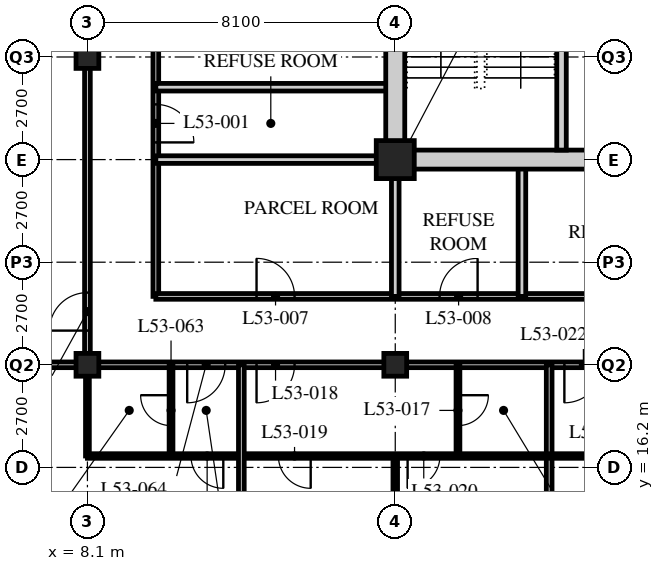
"""IFC4 building model, lengths in metres.
Left out: names, types, materials, properties, quantities, classifications, styles, units other than length and angle.
Written with IfcOpenShell. Run it as: python <this file> out.ifc"""

import sys

from ifc_helpers import new_model, si_unit, direction, frame, frame_2d, origin, origin_2d, place, context, subcontext, project, spatial, rectangle, hollow_rectangle, extrude, element, fill, save


model = new_model("IFC4")
c1 = context("Model", 3, precision=1e-05, world=origin(), true_north=direction((0.0, 1.0)))
c2 = subcontext(c1, "Body", "Model", "MODEL_VIEW")
j1 = project(units=[si_unit("LENGTHUNIT", "METRE"), si_unit("PLANEANGLEUNIT", "RADIAN")], contexts=[c1])
p1 = place(None, origin())
s1 = spatial("IfcSite", under=j1, at=p1, CompositionType="ELEMENT")
p2 = place(p1, origin())
s2 = spatial("IfcBuilding", under=s1, at=p2, CompositionType="ELEMENT")
p3 = place(p2, frame((0.0, 0.0, 206.4)))
s3 = spatial("IfcBuildingStorey", under=s2, at=p3, CompositionType="ELEMENT", Elevation=206.4)
for number, where, z_axis, x_axis in (
    (1, (8.1, 18.9, 0.0), (0.0, 0.0, 1.0), (1.0, 0.0, 0.0)),
    (2, (8.1, 27.0, 0.0), (0.0, 0.0, 1.0), (1.0, 0.0, 0.0)),
    (3, (16.2, 18.9, 0.0), (0.0, 0.0, 1.0), (1.0, 0.0, 0.0)),
):
    element("IfcColumn", number, at=place(p3, frame(where, z_axis=z_axis, x_axis=x_axis)), inside=s3, PredefinedType="COLUMN", context=c2, shape_type="SweptSolid", body=[
        extrude(hollow_rectangle(XDim=0.6, YDim=0.6, WallThickness=0.05, at=origin_2d()), origin(), (0.0, 0.0, 1.0), 3.6),
    ])
p4 = place(p3, frame((16.2, 24.3, 0.0), z_axis=(0.0, 0.0, 1.0), x_axis=(1.0, 0.0, 0.0)))
e4 = element("IfcColumn", 4, at=p4, inside=s3, PredefinedType="COLUMN", context=c2, shape_type="SweptSolid", body=[
    extrude(hollow_rectangle(XDim=1.0, YDim=1.0, WallThickness=0.1, at=origin_2d()), origin(), (0.0, 0.0, 1.0), 3.6),
])
p5 = place(p3, frame((8.1, 18.9, 0.0), z_axis=(0.0, 0.0, 1.0), x_axis=(1.0, 0.0, 0.0)))
e5 = element("IfcWall", 5, at=p5, inside=s3, PredefinedType="PARTITIONING", context=c2, shape_type="SweptSolid", body=[
    extrude(rectangle(XDim=36.45, YDim=0.15, at=frame_2d((18.225, 0.0))), origin(), (0.0, 0.0, 1.0), 2.778),
])
p6 = place(p5, frame((4.45, 0.0, 0.0)))
e6 = element("IfcOpeningElement", 6, at=p6, cuts=e5, PredefinedType="OPENING", context=c2, shape_type="SweptSolid", body=[
    extrude(rectangle(XDim=1.0, YDim=2.1, at=frame_2d((0.5, 1.05))), frame((0.0, 0.085, 0.0), z_axis=(0.0, -1.0, 0.0), x_axis=(1.0, 0.0, 0.0)), (0.0, 0.0, 1.0), 0.17),
])
p7 = place(p5, frame((12.55, 0.0, 0.0)))
e7 = element("IfcOpeningElement", 7, at=p7, cuts=e5, PredefinedType="OPENING", context=c2, shape_type="SweptSolid", body=[
    extrude(rectangle(XDim=1.0, YDim=2.1, at=frame_2d((0.5, 1.05))), frame((0.0, 0.085, 0.0), z_axis=(0.0, -1.0, 0.0), x_axis=(1.0, 0.0, 0.0)), (0.0, 0.0, 1.0), 0.17),
])
p8 = place(p5, frame((29.05, 0.0, 0.0)))
e8 = element("IfcOpeningElement", 8, at=p8, cuts=e5, PredefinedType="OPENING", context=c2, shape_type="SweptSolid", body=[
    extrude(rectangle(XDim=1.0, YDim=2.1, at=frame_2d((0.5, 1.05))), frame((0.0, 0.085, 0.0), z_axis=(0.0, -1.0, 0.0), x_axis=(1.0, 0.0, 0.0)), (0.0, 0.0, 1.0), 0.17),
])
p9 = place(p5, frame((2.625, 0.0, 0.0)))
e9 = element("IfcOpeningElement", 9, at=p9, cuts=e5, PredefinedType="OPENING", context=c2, shape_type="SweptSolid", body=[
    extrude(rectangle(XDim=1.0, YDim=2.1, at=frame_2d((0.5, 1.05))), frame((0.0, 0.085, 0.0), z_axis=(0.0, -1.0, 0.0), x_axis=(1.0, 0.0, 0.0)), (0.0, 0.0, 1.0), 0.17),
])
p10 = place(p5, frame((33.925, 0.0, 0.0)))
e10 = element("IfcOpeningElement", 10, at=p10, cuts=e5, PredefinedType="OPENING", context=c2, shape_type="SweptSolid", body=[
    extrude(rectangle(XDim=1.0, YDim=2.1, at=frame_2d((0.5, 1.05))), frame((0.0, 0.085, 0.0), z_axis=(0.0, -1.0, 0.0), x_axis=(1.0, 0.0, 0.0)), (0.0, 0.0, 1.0), 0.17),
])
p11 = place(p3, frame((8.1, 18.9, 0.0), z_axis=(0.0, 0.0, 1.0), x_axis=(0.0, 1.0, 0.0)))
e11 = element("IfcWall", 11, at=p11, inside=s3, PredefinedType="PARTITIONING", context=c2, shape_type="SweptSolid", body=[
    extrude(rectangle(XDim=28.35, YDim=0.15, at=frame_2d((14.175, 0.0))), origin(), (0.0, 0.0, 1.0), 2.778),
])
p12 = place(p11, frame((0.9, 0.0, 0.0)))
e12 = element("IfcOpeningElement", 12, at=p12, cuts=e11, PredefinedType="OPENING", context=c2, shape_type="SweptSolid", body=[
    extrude(rectangle(XDim=1.0, YDim=2.1, at=frame_2d((0.5, 1.05))), frame((0.0, 0.085, 0.0), z_axis=(0.0, -1.0, 0.0), x_axis=(1.0, 0.0, 0.0)), (0.0, 0.0, 1.0), 0.17),
])
p13 = place(p11, frame((17.1, 0.0, 0.0)))
e13 = element("IfcOpeningElement", 13, at=p13, cuts=e11, PredefinedType="OPENING", context=c2, shape_type="SweptSolid", body=[
    extrude(rectangle(XDim=1.0, YDim=2.1, at=frame_2d((0.5, 1.05))), frame((0.0, 0.085, 0.0), z_axis=(0.0, -1.0, 0.0), x_axis=(1.0, 0.0, 0.0)), (0.0, 0.0, 1.0), 0.17),
])
p14 = place(p11, frame((26.65, 0.0, 0.0)))
e14 = element("IfcOpeningElement", 14, at=p14, cuts=e11, PredefinedType="OPENING", context=c2, shape_type="SweptSolid", body=[
    extrude(rectangle(XDim=1.0, YDim=2.1, at=frame_2d((0.5, 1.05))), frame((0.0, 0.085, 0.0), z_axis=(0.0, -1.0, 0.0), x_axis=(1.0, 0.0, 0.0)), (0.0, 0.0, 1.0), 0.17),
])
p15 = place(p3, frame((9.9, 45.45, 0.0), z_axis=(0.0, 0.0, 1.0), x_axis=(0.0, -1.0, 0.0)))
e15 = element("IfcWall", 15, at=p15, inside=s3, PredefinedType="PARTITIONING", context=c2, shape_type="SweptSolid", body=[
    extrude(rectangle(XDim=24.75, YDim=0.15, at=frame_2d((12.375, 0.0))), origin(), (0.0, 0.0, 1.0), 3.39),
])
p16 = place(p15, frame((19.698, 0.0, 0.0)))
e16 = element("IfcOpeningElement", 16, at=p16, cuts=e15, PredefinedType="OPENING", context=c2, shape_type="SweptSolid", body=[
    extrude(rectangle(XDim=1.0, YDim=2.1, at=frame_2d((0.5, 1.05))), frame((0.0, 0.085, 0.0), z_axis=(0.0, -1.0, 0.0), x_axis=(1.0, 0.0, 0.0)), (0.0, 0.0, 1.0), 0.17),
])
p17 = place(p15, frame((15.648, 0.0, 0.0)))
e17 = element("IfcOpeningElement", 17, at=p17, cuts=e15, PredefinedType="OPENING", context=c2, shape_type="SweptSolid", body=[
    extrude(rectangle(XDim=1.0, YDim=2.1, at=frame_2d((0.5, 1.05))), frame((0.0, 0.085, 0.0), z_axis=(0.0, -1.0, 0.0), x_axis=(1.0, 0.0, 0.0)), (0.0, 0.0, 1.0), 0.17),
])
p18 = place(p15, frame((10.248, 0.0, 0.0)))
e18 = element("IfcOpeningElement", 18, at=p18, cuts=e15, PredefinedType="OPENING", context=c2, shape_type="SweptSolid", body=[
    extrude(rectangle(XDim=1.0, YDim=2.1, at=frame_2d((0.5, 1.05))), frame((0.0, 0.085, 0.0), z_axis=(0.0, -1.0, 0.0), x_axis=(1.0, 0.0, 0.0)), (0.0, 0.0, 1.0), 0.17),
])
p19 = place(p15, frame((6.198, 0.0, 0.0)))
e19 = element("IfcOpeningElement", 19, at=p19, cuts=e15, PredefinedType="OPENING", context=c2, shape_type="SweptSolid", body=[
    extrude(rectangle(XDim=1.0, YDim=2.1, at=frame_2d((0.5, 1.05))), frame((0.0, 0.085, 0.0), z_axis=(0.0, -1.0, 0.0), x_axis=(1.0, 0.0, 0.0)), (0.0, 0.0, 1.0), 0.17),
])
p20 = place(p3, frame((9.9, 20.7, 0.0), z_axis=(0.0, 0.0, 1.0), x_axis=(1.0, 0.0, 0.0)))
e20 = element("IfcWall", 20, at=p20, inside=s3, PredefinedType="PARTITIONING", context=c2, shape_type="SweptSolid", body=[
    extrude(rectangle(XDim=17.24, YDim=0.15, at=frame_2d((8.62, 0.0))), origin(), (0.0, 0.0, 1.0), 3.39),
])
p21 = place(p20, frame((2.65, 0.0, 0.0)))
e21 = element("IfcOpeningElement", 21, at=p21, cuts=e20, PredefinedType="OPENING", context=c2, shape_type="SweptSolid", body=[
    extrude(rectangle(XDim=1.0, YDim=2.1, at=frame_2d((0.5, 1.05))), frame((0.0, 0.085, 0.0), z_axis=(0.0, -1.0, 0.0), x_axis=(1.0, 0.0, 0.0)), (0.0, 0.0, 1.0), 0.17),
])
p22 = place(p20, frame((7.467, 0.0, 0.0)))
e22 = element("IfcOpeningElement", 22, at=p22, cuts=e20, PredefinedType="OPENING", context=c2, shape_type="SweptSolid", body=[
    extrude(rectangle(XDim=1.0, YDim=2.1, at=frame_2d((0.5, 1.05))), frame((0.0, 0.085, 0.0), z_axis=(0.0, -1.0, 0.0), x_axis=(1.0, 0.0, 0.0)), (0.0, 0.0, 1.0), 0.17),
])
p23 = place(p20, frame((12.942, 0.0, 0.0)))
e23 = element("IfcOpeningElement", 23, at=p23, cuts=e20, PredefinedType="OPENING", context=c2, shape_type="SweptSolid", body=[
    extrude(rectangle(XDim=1.0, YDim=2.1, at=frame_2d((0.5, 1.05))), frame((0.0, 0.085, 0.0), z_axis=(0.0, -1.0, 0.0), x_axis=(1.0, 0.0, 0.0)), (0.0, 0.0, 1.0), 0.17),
])
p24 = place(p3, frame((9.9, 26.205, 0.0), z_axis=(0.0, 0.0, 1.0), x_axis=(1.0, 0.0, 0.0)))
e24 = element("IfcWall", 24, at=p24, inside=s3, PredefinedType="SOLIDWALL", context=c2, shape_type="SweptSolid", body=[
    extrude(rectangle(XDim=6.3, YDim=0.2, at=frame_2d((3.15, 0.0))), origin(), (0.0, 0.0, 1.0), 3.39),
])
p25 = place(p3, frame((16.2, 20.7, 0.0), z_axis=(0.0, 0.0, 1.0), x_axis=(0.0, 1.0, 0.0)))
e25 = element("IfcWall", 25, at=p25, inside=s3, PredefinedType="SOLIDWALL", context=c2, shape_type="SweptSolid", body=[
    extrude(rectangle(XDim=3.6, YDim=0.2, at=frame_2d((1.8, 0.0))), origin(), (0.0, 0.0, 1.0), 2.778),
])
p26 = place(p3, frame((19.533, 20.7, 0.0), z_axis=(0.0, 0.0, 1.0), x_axis=(0.0, 1.0, 0.0)))
e26 = element("IfcWall", 26, at=p26, inside=s3, PredefinedType="SOLIDWALL", context=c2, shape_type="SweptSolid", body=[
    extrude(rectangle(XDim=3.6, YDim=0.2, at=frame_2d((1.8, 0.0))), origin(), (0.0, 0.0, 1.0), 3.39),
])
p27 = place(p3, frame((9.9, 24.3, 0.0), z_axis=(0.0, 0.0, 1.0), x_axis=(1.0, 0.0, 0.0)))
e27 = element("IfcWall", 27, at=p27, inside=s3, PredefinedType="SOLIDWALL", context=c2, shape_type="SweptSolid", body=[
    extrude(rectangle(XDim=6.3, YDim=0.2, at=frame_2d((3.15, 0.0))), origin(), (0.0, 0.0, 1.0), 3.39),
])
p28 = place(p3, frame((17.85, 18.9, 0.0), z_axis=(0.0, 0.0, 1.0), x_axis=(0.0, -1.0, 0.0)))
e28 = element("IfcWall", 28, at=p28, inside=s3, PredefinedType="PARTITIONING", context=c2, shape_type="SweptSolid", body=[
    extrude(rectangle(XDim=2.4, YDim=0.1, at=frame_2d((1.2, 0.0))), origin(), (0.0, 0.0, 1.0), 3.39),
])
p29 = place(p28, frame((0.8, 0.0, 0.0)))
e29 = element("IfcOpeningElement", 29, at=p29, cuts=e28, PredefinedType="OPENING", context=c2, shape_type="SweptSolid", body=[
    extrude(rectangle(XDim=0.8, YDim=2.1, at=frame_2d((0.4, 1.05))), frame((0.0, 0.06, 0.0), z_axis=(0.0, -1.0, 0.0), x_axis=(1.0, 0.0, 0.0)), (0.0, 0.0, 1.0), 0.12),
])
p30 = place(p3, frame((16.2, 16.5, 0.0), z_axis=(0.0, 0.0, 1.0), x_axis=(0.0, -1.0, 0.0)))
e30 = element("IfcWall", 30, at=p30, inside=s3, PredefinedType="PARTITIONING", context=c2, shape_type="SweptSolid", body=[
    extrude(rectangle(XDim=5.4, YDim=0.12, at=frame_2d((2.7, 0.0))), origin(), (0.0, 0.0, 1.0), 2.778),
])
p31 = place(p3, frame((20.25, 18.9, 0.0), z_axis=(0.0, 0.0, 1.0), x_axis=(0.0, -1.0, 0.0)))
e31 = element("IfcWall", 31, at=p31, inside=s3, PredefinedType="PARTITIONING", context=c2, shape_type="SweptSolid", body=[
    extrude(rectangle(XDim=7.8, YDim=0.15, at=frame_2d((3.9, 0.0))), origin(), (0.0, 0.0, 1.0), 3.39),
])
p32 = place(p3, frame((8.1, 16.5, 0.0), z_axis=(0.0, 0.0, 1.0), x_axis=(1.0, 0.0, 0.0)))
e32 = element("IfcWall", 32, at=p32, inside=s3, PredefinedType="PARTITIONING", context=c2, shape_type="SweptSolid", body=[
    extrude(rectangle(XDim=28.35, YDim=0.12, at=frame_2d((14.175, 0.0))), origin(), (0.0, 0.0, 1.0), 3.39),
])
p33 = place(p32, frame((5.025, 0.0, 0.0)))
e33 = element("IfcOpeningElement", 33, at=p33, cuts=e32, PredefinedType="OPENING", context=c2, shape_type="SweptSolid", body=[
    extrude(rectangle(XDim=0.85, YDim=2.1, at=frame_2d((0.425, 1.05))), frame((0.0, 0.07, 0.0), z_axis=(0.0, -1.0, 0.0), x_axis=(1.0, 0.0, 0.0)), (0.0, 0.0, 1.0), 0.14),
])
p34 = place(p32, frame((8.425, 0.0, 0.0)))
e34 = element("IfcOpeningElement", 34, at=p34, cuts=e32, PredefinedType="OPENING", context=c2, shape_type="SweptSolid", body=[
    extrude(rectangle(XDim=0.85, YDim=2.1, at=frame_2d((0.425, 1.05))), frame((0.0, 0.07, 0.0), z_axis=(0.0, -1.0, 0.0), x_axis=(1.0, 0.0, 0.0)), (0.0, 0.0, 1.0), 0.14),
])
p35 = place(p32, frame((13.125, 0.0, 0.0)))
e35 = element("IfcOpeningElement", 35, at=p35, cuts=e32, PredefinedType="OPENING", context=c2, shape_type="SweptSolid", body=[
    extrude(rectangle(XDim=0.85, YDim=2.1, at=frame_2d((0.425, 1.05))), frame((0.0, 0.07, 0.0), z_axis=(0.0, -1.0, 0.0), x_axis=(1.0, 0.0, 0.0)), (0.0, 0.0, 1.0), 0.14),
])
p36 = place(p32, frame((20.575, 0.0, 0.0)))
e36 = element("IfcOpeningElement", 36, at=p36, cuts=e32, PredefinedType="OPENING", context=c2, shape_type="SweptSolid", body=[
    extrude(rectangle(XDim=0.85, YDim=2.1, at=frame_2d((0.425, 1.05))), frame((0.0, 0.07, 0.0), z_axis=(0.0, -1.0, 0.0), x_axis=(1.0, 0.0, 0.0)), (0.0, 0.0, 1.0), 0.14),
])
p37 = place(p32, frame((24.625, 0.0, 0.0)))
e37 = element("IfcOpeningElement", 37, at=p37, cuts=e32, PredefinedType="OPENING", context=c2, shape_type="SweptSolid", body=[
    extrude(rectangle(XDim=0.85, YDim=2.1, at=frame_2d((0.425, 1.05))), frame((0.0, 0.07, 0.0), z_axis=(0.0, -1.0, 0.0), x_axis=(1.0, 0.0, 0.0)), (0.0, 0.0, 1.0), 0.14),
])
p38 = place(p32, frame((2.725, 0.0, 0.0)))
e38 = element("IfcOpeningElement", 38, at=p38, cuts=e32, PredefinedType="OPENING", context=c2, shape_type="SweptSolid", body=[
    extrude(rectangle(XDim=0.85, YDim=2.1, at=frame_2d((0.425, 1.05))), frame((0.0, 0.07, 0.0), z_axis=(0.0, -1.0, 0.0), x_axis=(1.0, 0.0, 0.0)), (0.0, 0.0, 1.0), 0.14),
])
p39 = place(p3, frame((10.3, 18.9, 0.0), z_axis=(0.0, 0.0, 1.0), x_axis=(0.0, -1.0, 0.0)))
e39 = element("IfcWall", 39, at=p39, inside=s3, PredefinedType="PARTITIONING", context=c2, shape_type="SweptSolid", body=[
    extrude(rectangle(XDim=2.4, YDim=0.1, at=frame_2d((1.2, 0.0))), origin(), (0.0, 0.0, 1.0), 3.39),
])
p40 = place(p39, frame((0.8, 0.0, 0.0)))
e40 = element("IfcOpeningElement", 40, at=p40, cuts=e39, PredefinedType="OPENING", context=c2, shape_type="SweptSolid", body=[
    extrude(rectangle(XDim=0.8, YDim=2.1, at=frame_2d((0.4, 1.05))), frame((0.0, 0.06, 0.0), z_axis=(0.0, -1.0, 0.0), x_axis=(1.0, 0.0, 0.0)), (0.0, 0.0, 1.0), 0.12),
])
p41 = place(p3, frame((8.1, 18.9, 0.0), z_axis=(0.0, 0.0, 1.0), x_axis=(0.0, -1.0, 0.0)))
e41 = element("IfcWall", 41, at=p41, inside=s3, PredefinedType="PARTITIONING", context=c2, shape_type="SweptSolid", body=[
    extrude(rectangle(XDim=2.4, YDim=0.1, at=frame_2d((1.2, 0.0))), origin(), (0.0, 0.0, 1.0), 2.778),
])
p42 = place(p3, frame((4.35, 18.9, 0.0), z_axis=(0.0, 0.0, 1.0), x_axis=(1.0, 0.0, 0.0)))
e42 = element("IfcWall", 42, at=p42, inside=s3, PredefinedType="PARTITIONING", context=c2, shape_type="SweptSolid", body=[
    extrude(rectangle(XDim=3.75, YDim=0.15, at=frame_2d((1.875, 0.0))), origin(), (0.0, 0.0, 1.0), 2.778),
])
p43 = place(p3, frame((12.15, 18.9, 0.0), z_axis=(0.0, 0.0, 1.0), x_axis=(0.0, -1.0, 0.0)))
e43 = element("IfcWall", 43, at=p43, inside=s3, PredefinedType="PARTITIONING", context=c2, shape_type="SweptSolid", body=[
    extrude(rectangle(XDim=7.8, YDim=0.15, at=frame_2d((3.9, 0.0))), origin(), (0.0, 0.0, 1.0), 3.39),
])
p44 = place(p3, frame((15.95, 24.3, 0.0), z_axis=(0.0, 0.0, 1.0), x_axis=(1.0, 0.0, 0.0)))
e44 = element("IfcWall", 44, at=p44, inside=s3, PredefinedType="SOLIDWALL", context=c2, shape_type="SweptSolid", body=[
    extrude(rectangle(XDim=24.8, YDim=0.5, at=frame_2d((12.4, 0.0))), origin(), (0.0, 0.0, 1.0), 2.74),
])
p45 = place(p44, frame((11.5, 0.0, 0.0)))
e45 = element("IfcOpeningElement", 45, at=p45, cuts=e44, PredefinedType="OPENING", context=c2, shape_type="SweptSolid", body=[
    extrude(rectangle(XDim=1.8, YDim=2.4, at=frame_2d((0.9, 1.2))), frame((0.0, 0.26, 0.0), z_axis=(0.0, -1.0, 0.0), x_axis=(1.0, 0.0, 0.0)), (0.0, 0.0, 1.0), 0.52),
])
p46 = place(p3, frame((16.2, 24.55, 0.0), z_axis=(0.0, 0.0, 1.0), x_axis=(0.0, 1.0, 0.0)))
e46 = element("IfcWall", 46, at=p46, inside=s3, PredefinedType="SOLIDWALL", context=c2, shape_type="SweptSolid", body=[
    extrude(rectangle(XDim=15.7, YDim=0.5, at=frame_2d((7.85, 0.0))), origin(), (0.0, 0.0, 1.0), 2.778),
])
p47 = place(p3, frame((20.575, 24.55, 0.0), z_axis=(0.0, 0.0, 1.0), x_axis=(0.0, 1.0, 0.0)))
e47 = element("IfcWall", 47, at=p47, inside=s3, PredefinedType="SOLIDWALL", context=c2, shape_type="SweptSolid", body=[
    extrude(rectangle(XDim=7.75, YDim=0.25, at=frame_2d((3.875, 0.0))), origin(), (0.0, 0.0, 1.0), 3.39),
])
p48 = place(p47, frame((6.2, 0.0, 0.0)))
e48 = element("IfcOpeningElement", 48, at=p48, cuts=e47, PredefinedType="OPENING", context=c2, shape_type="SweptSolid", body=[
    extrude(rectangle(XDim=1.2, YDim=2.1, at=frame_2d((0.6, 1.05))), frame((0.0, 0.135, 0.0), z_axis=(0.0, -1.0, 0.0), x_axis=(1.0, 0.0, 0.0)), (0.0, 0.0, 1.0), 0.27),
])
p49 = place(p16, origin())
e49 = element("IfcDoor", 49, at=p49, inside=s3, OperationType="SINGLE_SWING_RIGHT", PredefinedType="DOOR", context=c2, shape_type="SweptSolid", body=[
    extrude(rectangle(XDim=1.0, YDim=2.1, at=frame_2d((0.5, 1.05))), frame((0.0, 0.025, 0.0), z_axis=(0.0, -1.0, 0.0), x_axis=(1.0, 0.0, 0.0)), (0.0, 0.0, 1.0), 0.05),
])
fill(e16, e49)
p50 = place(p21, origin())
e50 = element("IfcDoor", 50, at=p50, inside=s3, OperationType="SINGLE_SWING_LEFT", PredefinedType="DOOR", context=c2, shape_type="SweptSolid", body=[
    extrude(rectangle(XDim=1.0, YDim=2.1, at=frame_2d((0.5, 1.05))), frame((0.0, 0.025, 0.0), z_axis=(0.0, -1.0, 0.0), x_axis=(1.0, 0.0, 0.0)), (0.0, 0.0, 1.0), 0.05),
])
fill(e21, e50)
p51 = place(p22, origin())
e51 = element("IfcDoor", 51, at=p51, inside=s3, OperationType="SINGLE_SWING_RIGHT", PredefinedType="DOOR", context=c2, shape_type="SweptSolid", body=[
    extrude(rectangle(XDim=1.0, YDim=2.1, at=frame_2d((0.5, 1.05))), frame((0.0, 0.025, 0.0), z_axis=(0.0, -1.0, 0.0), x_axis=(1.0, 0.0, 0.0)), (0.0, 0.0, 1.0), 0.05),
])
fill(e22, e51)
p52 = place(p29, origin())
e52 = element("IfcDoor", 52, at=p52, inside=s3, OperationType="SINGLE_SWING_LEFT", PredefinedType="DOOR", context=c2, shape_type="SweptSolid", body=[
    extrude(rectangle(XDim=0.8, YDim=2.1, at=frame_2d((0.4, 1.05))), frame((0.0, 0.025, 0.0), z_axis=(0.0, -1.0, 0.0), x_axis=(1.0, 0.0, 0.0)), (0.0, 0.0, 1.0), 0.05),
])
fill(e29, e52)
p53 = place(p6, origin())
e53 = element("IfcDoor", 53, at=p53, inside=s3, OperationType="SINGLE_SWING_RIGHT", PredefinedType="DOOR", context=c2, shape_type="SweptSolid", body=[
    extrude(rectangle(XDim=1.0, YDim=2.1, at=frame_2d((0.5, 1.05))), frame((0.0, 0.025, 0.0), z_axis=(0.0, -1.0, 0.0), x_axis=(1.0, 0.0, 0.0)), (0.0, 0.0, 1.0), 0.05),
])
fill(e6, e53)
p54 = place(p33, origin())
e54 = element("IfcDoor", 54, at=p54, inside=s3, OperationType="SINGLE_SWING_LEFT", PredefinedType="DOOR", context=c2, shape_type="SweptSolid", body=[
    extrude(rectangle(XDim=0.85, YDim=2.1, at=frame_2d((0.425, 1.05))), frame((0.0, 0.025, 0.0), z_axis=(0.0, -1.0, 0.0), x_axis=(1.0, 0.0, 0.0)), (0.0, 0.0, 1.0), 0.05),
])
fill(e33, e54)
p55 = place(p34, origin())
e55 = element("IfcDoor", 55, at=p55, inside=s3, OperationType="SINGLE_SWING_RIGHT", PredefinedType="DOOR", context=c2, shape_type="SweptSolid", body=[
    extrude(rectangle(XDim=0.85, YDim=2.1, at=frame_2d((0.425, 1.05))), frame((0.0, 0.025, 0.0), z_axis=(0.0, -1.0, 0.0), x_axis=(1.0, 0.0, 0.0)), (0.0, 0.0, 1.0), 0.05),
])
fill(e34, e55)
p56 = place(p7, origin())
e56 = element("IfcDoor", 56, at=p56, inside=s3, OperationType="SINGLE_SWING_RIGHT", PredefinedType="DOOR", context=c2, shape_type="SweptSolid", body=[
    extrude(rectangle(XDim=1.0, YDim=2.1, at=frame_2d((0.5, 1.05))), frame((0.0, 0.025, 0.0), z_axis=(0.0, -1.0, 0.0), x_axis=(1.0, 0.0, 0.0)), (0.0, 0.0, 1.0), 0.05),
])
fill(e7, e56)
p57 = place(p12, origin())
e57 = element("IfcDoor", 57, at=p57, inside=s3, OperationType="SINGLE_SWING_LEFT", PredefinedType="DOOR", context=c2, shape_type="SweptSolid", body=[
    extrude(rectangle(XDim=1.0, YDim=2.1, at=frame_2d((0.5, 1.05))), frame((0.0, 0.025, 0.0), z_axis=(0.0, -1.0, 0.0), x_axis=(1.0, 0.0, 0.0)), (0.0, 0.0, 1.0), 0.05),
])
fill(e12, e57)
p58 = place(p40, origin())
e58 = element("IfcDoor", 58, at=p58, inside=s3, OperationType="SINGLE_SWING_RIGHT", PredefinedType="DOOR", context=c2, shape_type="SweptSolid", body=[
    extrude(rectangle(XDim=0.8, YDim=2.1, at=frame_2d((0.4, 1.05))), frame((0.0, 0.025, 0.0), z_axis=(0.0, -1.0, 0.0), x_axis=(1.0, 0.0, 0.0)), (0.0, 0.0, 1.0), 0.05),
])
fill(e40, e58)
p59 = place(p9, origin())
e59 = element("IfcDoor", 59, at=p59, inside=s3, OperationType="SINGLE_SWING_RIGHT", PredefinedType="DOOR", context=c2, shape_type="SweptSolid", body=[
    extrude(rectangle(XDim=1.0, YDim=2.1, at=frame_2d((0.5, 1.05))), frame((0.0, 0.025, 0.0), z_axis=(0.0, -1.0, 0.0), x_axis=(1.0, 0.0, 0.0)), (0.0, 0.0, 1.0), 0.05),
])
fill(e9, e59)
p60 = place(p38, origin())
e60 = element("IfcDoor", 60, at=p60, inside=s3, OperationType="SINGLE_SWING_LEFT", PredefinedType="DOOR", context=c2, shape_type="SweptSolid", body=[
    extrude(rectangle(XDim=0.85, YDim=2.1, at=frame_2d((0.425, 1.05))), frame((0.0, 0.025, 0.0), z_axis=(0.0, -1.0, 0.0), x_axis=(1.0, 0.0, 0.0)), (0.0, 0.0, 1.0), 0.05),
])
fill(e38, e60)
save(model, sys.argv[1])
